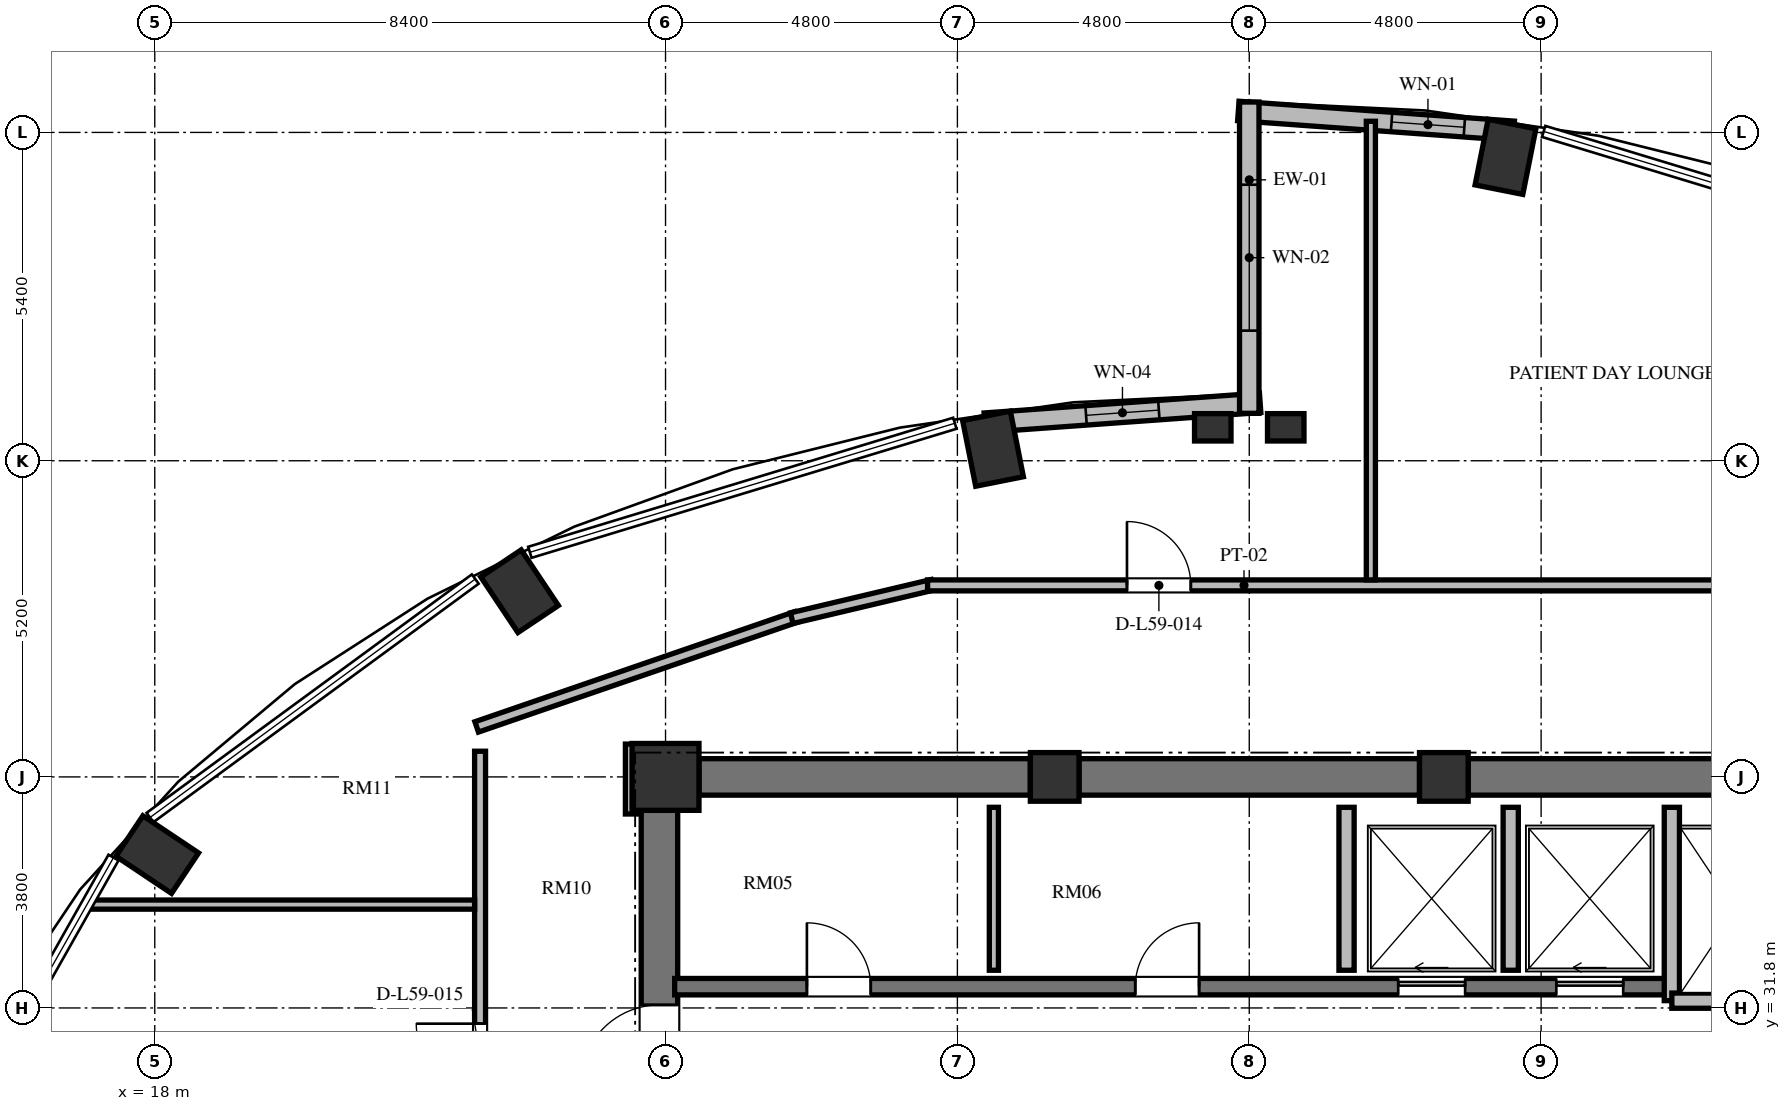
"""IFC4 building model, lengths in metres.
Left out: names, types, materials, properties, quantities, classifications, styles, units other than length and angle.
Written with IfcOpenShell. Run it as: python <this file> out.ifc"""

import sys

from ifc_helpers import new_model, si_unit, direction, frame, frame_2d, origin, origin_2d, place, context, subcontext, project, spatial, rectangle, extrude, element, fill, save


model = new_model("IFC4")
c1 = context("Model", 3, precision=1e-05, world=origin(), true_north=direction((0.0, 1.0)))
c2 = subcontext(c1, "Body", "Model", "MODEL_VIEW")
j1 = project(units=[si_unit("LENGTHUNIT", "METRE"), si_unit("PLANEANGLEUNIT", "RADIAN")], contexts=[c1])
p1 = place(None, origin())
s1 = spatial("IfcSite", under=j1, at=p1, CompositionType="ELEMENT")
p2 = place(p1, origin())
s2 = spatial("IfcBuilding", under=s1, at=p2, CompositionType="ELEMENT")
p3 = place(p2, frame((0.0, 0.0, 227.664)))
s3 = spatial("IfcBuildingStorey", under=s2, at=p3, CompositionType="ELEMENT", Elevation=227.664)
for number, where, z_axis, x_axis in (
    (1, (40.214, 45.798, 0.0), (0.0, 0.0, 1.0), (0.195, 0.981, 0.0)),
    (2, (31.786, 40.998, 0.0), (0.0, 0.0, 1.0), (-0.195, 0.981, 0.0)),
    (3, (24.0, 38.654, 0.0), (0.0, 0.0, 1.0), (-0.556, 0.831, 0.0)),
    (4, (18.04, 34.323, 0.0), (0.0, 0.0, 1.0), (-0.831, 0.556, 0.0)),
):
    element("IfcColumn", number, at=place(p3, frame(where, z_axis=z_axis, x_axis=x_axis)), inside=s3, PredefinedType="COLUMN", context=c2, shape_type="SweptSolid", body=[
        extrude(rectangle(XDim=1.1, YDim=0.8, at=origin_2d()), origin(), (0.0, 0.0, 1.0), 3.648),
    ])
for number, where, z_axis, x_axis in (
    (5, (39.2, 35.6, 0.0), (0.0, 0.0, 1.0), (1.0, 0.0, 0.0)),
    (6, (32.8, 35.6, 0.0), (0.0, 0.0, 1.0), (1.0, 0.0, 0.0)),
):
    element("IfcColumn", number, at=place(p3, frame(where, z_axis=z_axis, x_axis=x_axis)), inside=s3, PredefinedType="COLUMN", context=c2, shape_type="SweptSolid", body=[
        extrude(rectangle(XDim=0.8, YDim=0.8, at=origin_2d()), origin(), (0.0, 0.0, 1.0), 3.648),
    ])
p4 = place(p3, frame((26.4, 35.6, 0.0), z_axis=(0.0, 0.0, 1.0), x_axis=(1.0, 0.0, 0.0)))
e7 = element("IfcColumn", 7, at=p4, inside=s3, PredefinedType="COLUMN", context=c2, shape_type="SweptSolid", body=[
    extrude(rectangle(XDim=1.1, YDim=1.1, at=origin_2d()), origin(), (0.0, 0.0, 1.0), 3.648),
])
for number, where, z_axis, x_axis in (
    (8, (35.4, 41.35, 0.0), (0.0, 0.0, 1.0), (1.0, 0.0, 0.0)),
    (9, (36.6, 41.35, 0.0), (0.0, 0.0, 1.0), (1.0, 0.0, 0.0)),
):
    element("IfcColumn", number, at=place(p3, frame(where, z_axis=z_axis, x_axis=x_axis)), inside=s3, PredefinedType="PILASTER", context=c2, shape_type="SweptSolid", body=[
        extrude(rectangle(XDim=0.6, YDim=0.45, at=origin_2d()), origin(), (0.0, 0.0, 1.0), 3.648),
    ])
p5 = place(p3, frame((26.3, 20.95, 0.0), z_axis=(0.0, 0.0, 1.0), x_axis=(0.0, 1.0, 0.0)))
e10 = element("IfcWall", 10, at=p5, inside=s3, PredefinedType="SHEAR", context=c2, shape_type="SweptSolid", body=[
    extrude(rectangle(XDim=14.1, YDim=0.6, at=frame_2d((7.05, 0.0))), origin(), (0.0, 0.0, 1.0), 3.648),
])
p6 = place(p5, frame((6.5, 0.0, 0.0)))
e11 = element("IfcOpeningElement", 11, at=p6, cuts=e10, PredefinedType="OPENING", context=c2, shape_type="SweptSolid", body=[
    extrude(rectangle(XDim=1.2, YDim=2.15, at=frame_2d((0.6, 1.075))), frame((0.0, 0.31, 0.0), z_axis=(0.0, -1.0, 0.0), x_axis=(1.0, 0.0, 0.0)), (0.0, 0.0, 1.0), 0.62),
])
p7 = place(p5, frame((9.6, 0.0, 0.0)))
e12 = element("IfcOpeningElement", 12, at=p7, cuts=e10, PredefinedType="OPENING", context=c2, shape_type="SweptSolid", body=[
    extrude(rectangle(XDim=1.3, YDim=2.2, at=frame_2d((0.65, 1.1))), frame((0.0, 0.31, 0.0), z_axis=(0.0, -1.0, 0.0), x_axis=(1.0, 0.0, 0.0)), (0.0, 0.0, 1.0), 0.62),
])
p8 = place(p5, frame((3.26, 0.0, 0.0)))
e13 = element("IfcOpeningElement", 13, at=p8, cuts=e10, PredefinedType="OPENING", context=c2, shape_type="SweptSolid", body=[
    extrude(rectangle(XDim=1.3, YDim=2.2, at=frame_2d((0.65, 1.1))), frame((0.0, 0.31, 0.0), z_axis=(0.0, -1.0, 0.0), x_axis=(1.0, 0.0, 0.0)), (0.0, 0.0, 1.0), 0.62),
])
p9 = place(p3, frame((26.95, 35.6, 0.0), z_axis=(0.0, 0.0, 1.0), x_axis=(1.0, 0.0, 0.0)))
e14 = element("IfcWall", 14, at=p9, inside=s3, PredefinedType="SHEAR", context=c2, shape_type="SweptSolid", body=[
    extrude(rectangle(XDim=5.45, YDim=0.6, at=frame_2d((2.725, 0.0))), origin(), (0.0, 0.0, 1.0), 3.648),
])
p10 = place(p3, frame((33.2, 35.6, 0.0), z_axis=(0.0, 0.0, 1.0), x_axis=(1.0, 0.0, 0.0)))
e15 = element("IfcWall", 15, at=p10, inside=s3, PredefinedType="SHEAR", context=c2, shape_type="SweptSolid", body=[
    extrude(rectangle(XDim=5.6, YDim=0.6, at=frame_2d((2.8, 0.0))), origin(), (0.0, 0.0, 1.0), 3.648),
])
p11 = place(p3, frame((39.6, 35.6, 0.0), z_axis=(0.0, 0.0, 1.0), x_axis=(1.0, 0.0, 0.0)))
e16 = element("IfcWall", 16, at=p11, inside=s3, PredefinedType="SHEAR", context=c2, shape_type="SweptSolid", body=[
    extrude(rectangle(XDim=5.45, YDim=0.6, at=frame_2d((2.725, 0.0))), origin(), (0.0, 0.0, 1.0), 3.648),
])
p12 = place(p3, frame((40.35, 46.226, 0.0), z_axis=(0.0, 0.0, 1.0), x_axis=(-0.997409061056, 0.071938619141, 0.0)))
e17 = element("IfcWall", 17, at=p12, inside=s3, PredefinedType="SOLIDWALL", context=c2, shape_type="SweptSolid", body=[
    extrude(rectangle(XDim=4.541, YDim=0.32, at=frame_2d((2.271, 0.0))), origin(), (0.0, 0.0, 1.0), 3.448),
])
p13 = place(p12, frame((0.815, 0.0, 0.85)))
e18 = element("IfcOpeningElement", 18, at=p13, cuts=e17, PredefinedType="OPENING", context=c2, shape_type="SweptSolid", body=[
    extrude(rectangle(XDim=1.2, YDim=2.2, at=frame_2d((0.6, 1.1))), frame((0.0, 0.17, 0.0), z_axis=(0.0, -1.0, 0.0), x_axis=(1.0, 0.0, 0.0)), (0.0, 0.0, 1.0), 0.34),
])
p14 = place(p3, frame((36.179, 41.753, 0.0), z_axis=(0.0, 0.0, 1.0), x_axis=(-0.997408782787, -0.071942477163, 0.0)))
e19 = element("IfcWall", 19, at=p14, inside=s3, PredefinedType="SOLIDWALL", context=c2, shape_type="SweptSolid", body=[
    extrude(rectangle(XDim=4.541, YDim=0.32, at=frame_2d((2.27, 0.0))), origin(), (0.0, 0.0, 1.0), 3.448),
])
p15 = place(p14, frame((1.67, 0.0, 0.85)))
e20 = element("IfcOpeningElement", 20, at=p15, cuts=e19, PredefinedType="OPENING", context=c2, shape_type="SweptSolid", body=[
    extrude(rectangle(XDim=1.2, YDim=1.8, at=frame_2d((0.6, 0.9))), frame((0.0, 0.17, 0.0), z_axis=(0.0, -1.0, 0.0), x_axis=(1.0, 0.0, 0.0)), (0.0, 0.0, 1.0), 0.34),
])
p16 = place(p3, frame((36.0, 46.7, 0.0), z_axis=(0.0, 0.0, 1.0), x_axis=(0.0, -1.0, 0.0)))
e21 = element("IfcWall", 21, at=p16, inside=s3, PredefinedType="SOLIDWALL", context=c2, shape_type="SweptSolid", body=[
    extrude(rectangle(XDim=5.12, YDim=0.32, at=frame_2d((2.56, 0.0))), origin(), (0.0, 0.0, 1.0), 3.448),
])
p17 = place(p16, frame((1.36, 0.0, 0.84)))
e22 = element("IfcOpeningElement", 22, at=p17, cuts=e21, PredefinedType="OPENING", context=c2, shape_type="SweptSolid", body=[
    extrude(rectangle(XDim=2.4, YDim=2.04, at=frame_2d((1.2, 1.02))), frame((0.0, 0.17, 0.0), z_axis=(0.0, -1.0, 0.0), x_axis=(1.0, 0.0, 0.0)), (0.0, 0.0, 1.0), 0.34),
])
p18 = place(p3, frame((26.55, 32.15, 0.0), z_axis=(0.0, 0.0, 1.0), x_axis=(1.0, 0.0, 0.0)))
e23 = element("IfcWall", 23, at=p18, inside=s3, PredefinedType="SHEAR", context=c2, shape_type="SweptSolid", body=[
    extrude(rectangle(XDim=16.4, YDim=0.27, at=frame_2d((8.2, 0.0))), origin(), (0.0, 0.0, 1.0), 3.648),
])
p19 = place(p18, frame((2.175, 0.0, 0.0)))
e24 = element("IfcOpeningElement", 24, at=p19, cuts=e23, PredefinedType="OPENING", context=c2, shape_type="SweptSolid", body=[
    extrude(rectangle(XDim=1.05, YDim=2.15, at=frame_2d((0.525, 1.075))), frame((0.0, 0.145, 0.0), z_axis=(0.0, -1.0, 0.0), x_axis=(1.0, 0.0, 0.0)), (0.0, 0.0, 1.0), 0.29),
])
p20 = place(p18, frame((7.575, 0.0, 0.0)))
e25 = element("IfcOpeningElement", 25, at=p20, cuts=e23, PredefinedType="OPENING", context=c2, shape_type="SweptSolid", body=[
    extrude(rectangle(XDim=1.05, YDim=2.15, at=frame_2d((0.525, 1.075))), frame((0.0, 0.145, 0.0), z_axis=(0.0, -1.0, 0.0), x_axis=(1.0, 0.0, 0.0)), (0.0, 0.0, 1.0), 0.29),
])
p21 = place(p18, frame((11.9, 0.0, 0.0)))
e26 = element("IfcOpeningElement", 26, at=p21, cuts=e23, PredefinedType="OPENING", context=c2, shape_type="SweptSolid", body=[
    extrude(rectangle(XDim=1.1, YDim=2.2, at=frame_2d((0.55, 1.1))), frame((0.0, 0.145, 0.0), z_axis=(0.0, -1.0, 0.0), x_axis=(1.0, 0.0, 0.0)), (0.0, 0.0, 1.0), 0.29),
])
p22 = place(p18, frame((14.5, 0.0, 0.0)))
e27 = element("IfcOpeningElement", 27, at=p22, cuts=e23, PredefinedType="OPENING", context=c2, shape_type="SweptSolid", body=[
    extrude(rectangle(XDim=1.1, YDim=2.2, at=frame_2d((0.55, 1.1))), frame((0.0, 0.145, 0.0), z_axis=(0.0, -1.0, 0.0), x_axis=(1.0, 0.0, 0.0)), (0.0, 0.0, 1.0), 0.29),
])
p23 = place(p3, frame((42.95, 31.92, 0.0), z_axis=(0.0, 0.0, 1.0), x_axis=(0.0, 1.0, 0.0)))
e28 = element("IfcWall", 28, at=p23, inside=s3, PredefinedType="SOLIDWALL", context=c2, shape_type="SweptSolid", body=[
    extrude(rectangle(XDim=3.18, YDim=0.25, at=frame_2d((1.59, 0.0))), origin(), (0.0, 0.0, 1.0), 3.448),
])
p24 = place(p3, frame((42.95, 31.92, 0.0), z_axis=(0.0, 0.0, 1.0), x_axis=(1.0, 0.0, 0.0)))
e29 = element("IfcWall", 29, at=p24, inside=s3, PredefinedType="SOLIDWALL", context=c2, shape_type="SweptSolid", body=[
    extrude(rectangle(XDim=2.3, YDim=0.25, at=frame_2d((1.15, 0.0))), origin(), (0.0, 0.0, 1.0), 3.448),
])
for number, where, z_axis, x_axis in (
    (30, (37.6, 32.42, 0.0), (0.0, 0.0, 1.0), (0.0, 1.0, 0.0)),
    (31, (40.3, 32.42, 0.0), (0.0, 0.0, 1.0), (0.0, 1.0, 0.0)),
):
    element("IfcWall", number, at=place(p3, frame(where, z_axis=z_axis, x_axis=x_axis)), inside=s3, PredefinedType="SOLIDWALL", context=c2, shape_type="SweptSolid", body=[
        extrude(rectangle(XDim=2.68, YDim=0.25, at=frame_2d((1.34, 0.0))), origin(), (0.0, 0.0, 1.0), 3.448),
    ])
p25 = place(p3, frame((31.8, 32.42, 0.0), z_axis=(0.0, 0.0, 1.0), x_axis=(0.0, 1.0, 0.0)))
e32 = element("IfcWall", 32, at=p25, inside=s3, PredefinedType="PARTITIONING", context=c2, shape_type="SweptSolid", body=[
    extrude(rectangle(XDim=2.68, YDim=0.15, at=frame_2d((1.34, 0.0))), origin(), (0.0, 0.0, 1.0), 3.448),
])
p26 = place(p3, frame((23.294, 36.422, 0.0), z_axis=(0.0, 0.0, 1.0), x_axis=(0.945493277461, 0.325641616316, 0.0)))
e33 = element("IfcWall", 33, at=p26, inside=s3, PredefinedType="PARTITIONING", context=c2, shape_type="SweptSolid", body=[
    extrude(rectangle(XDim=5.562, YDim=0.18, at=frame_2d((2.781, 0.0))), origin(), (0.0, 0.0, 1.0), 3.073),
])
p27 = place(p3, frame((28.476, 38.211, 0.0), z_axis=(0.0, 0.0, 1.0), x_axis=(0.973030562203, 0.230676234189, 0.0)))
e34 = element("IfcWall", 34, at=p27, inside=s3, PredefinedType="PARTITIONING", context=c2, shape_type="SweptSolid", body=[
    extrude(rectangle(XDim=2.377, YDim=0.18, at=frame_2d((1.188, 0.0))), origin(), (0.0, 0.0, 1.0), 3.448),
])
p28 = place(p3, frame((30.71, 38.75, 0.0), z_axis=(0.0, 0.0, 1.0), x_axis=(1.0, 0.0, 0.0)))
e35 = element("IfcWall", 35, at=p28, inside=s3, PredefinedType="PARTITIONING", context=c2, shape_type="SweptSolid", body=[
    extrude(rectangle(XDim=20.815, YDim=0.18, at=frame_2d((10.408, 0.0))), origin(), (0.0, 0.0, 1.0), 3.073),
])
p29 = place(p28, frame((13.194, 0.0, 0.0)))
e36 = element("IfcOpeningElement", 36, at=p29, cuts=e35, PredefinedType="OPENING", context=c2, shape_type="SweptSolid", body=[
    extrude(rectangle(XDim=1.4, YDim=2.2, at=frame_2d((0.7, 1.1))), frame((0.0, 0.1, 0.0), z_axis=(0.0, -1.0, 0.0), x_axis=(1.0, 0.0, 0.0)), (0.0, 0.0, 1.0), 0.2),
])
p30 = place(p28, frame((3.279, 0.0, 0.0)))
e37 = element("IfcOpeningElement", 37, at=p30, cuts=e35, PredefinedType="OPENING", context=c2, shape_type="SweptSolid", body=[
    extrude(rectangle(XDim=1.05, YDim=2.15, at=frame_2d((0.525, 1.075))), frame((0.0, 0.1, 0.0), z_axis=(0.0, -1.0, 0.0), x_axis=(1.0, 0.0, 0.0)), (0.0, 0.0, 1.0), 0.2),
])
p31 = place(p3, frame((25.83, 36.14, 0.0), z_axis=(0.0, 0.0, 1.0), x_axis=(0.0, -1.0, 0.0)))
e38 = element("IfcWall", 38, at=p31, inside=s3, PredefinedType="PARTITIONING", context=c2, shape_type="SweptSolid", body=[
    extrude(rectangle(XDim=1.15, YDim=0.18, at=frame_2d((0.575, 0.0))), origin(), (0.0, 0.0, 1.0), 3.448),
])
p32 = place(p3, frame((23.35, 19.98, 0.0), z_axis=(0.0, 0.0, 1.0), x_axis=(0.0, 1.0, 0.0)))
e39 = element("IfcWall", 39, at=p32, inside=s3, PredefinedType="PARTITIONING", context=c2, shape_type="SweptSolid", body=[
    extrude(rectangle(XDim=16.042, YDim=0.18, at=frame_2d((8.021, 0.0))), origin(), (0.0, 0.0, 1.0), 3.448),
])
p33 = place(p32, frame((5.477, 0.0, 0.0)))
e40 = element("IfcOpeningElement", 40, at=p33, cuts=e39, PredefinedType="OPENING", context=c2, shape_type="SweptSolid", body=[
    extrude(rectangle(XDim=1.05, YDim=2.15, at=frame_2d((0.525, 1.075))), frame((0.0, 0.1, 0.0), z_axis=(0.0, -1.0, 0.0), x_axis=(1.0, 0.0, 0.0)), (0.0, 0.0, 1.0), 0.2),
])
p34 = place(p32, frame((1.219, 0.0, 0.0)))
e41 = element("IfcOpeningElement", 41, at=p34, cuts=e39, PredefinedType="OPENING", context=c2, shape_type="SweptSolid", body=[
    extrude(rectangle(XDim=1.4, YDim=2.2, at=frame_2d((0.7, 1.1))), frame((0.0, 0.1, 0.0), z_axis=(0.0, -1.0, 0.0), x_axis=(1.0, 0.0, 0.0)), (0.0, 0.0, 1.0), 0.2),
])
p35 = place(p32, frame((10.511, 0.0, 0.0)))
e42 = element("IfcOpeningElement", 42, at=p35, cuts=e39, PredefinedType="OPENING", context=c2, shape_type="SweptSolid", body=[
    extrude(rectangle(XDim=1.05, YDim=2.15, at=frame_2d((0.525, 1.075))), frame((0.0, 0.1, 0.0), z_axis=(0.0, -1.0, 0.0), x_axis=(1.0, 0.0, 0.0)), (0.0, 0.0, 1.0), 0.2),
])
p36 = place(p3, frame((16.895, 33.5, 0.0), z_axis=(0.0, 0.0, 1.0), x_axis=(1.0, 0.0, 0.0)))
e43 = element("IfcWall", 43, at=p36, inside=s3, PredefinedType="PARTITIONING", context=c2, shape_type="SweptSolid", body=[
    extrude(rectangle(XDim=6.365, YDim=0.15, at=frame_2d((3.183, 0.0))), origin(), (0.0, 0.0, 1.0), 3.448),
])
p37 = place(p3, frame((38.0, 38.84, 0.0), z_axis=(0.0, 0.0, 1.0), x_axis=(0.0, 1.0, 0.0)))
e44 = element("IfcWall", 44, at=p37, inside=s3, PredefinedType="PARTITIONING", context=c2, shape_type="SweptSolid", body=[
    extrude(rectangle(XDim=7.543, YDim=0.15, at=frame_2d((3.771, 0.0))), origin(), (0.0, 0.0, 1.0), 3.448),
])
p38 = place(p13, origin())
e45 = element("IfcWindow", 45, at=p38, inside=s3, PartitioningType="SINGLE_PANEL", PredefinedType="WINDOW", context=c2, shape_type="SweptSolid", body=[
    extrude(rectangle(XDim=1.2, YDim=2.2, at=frame_2d((0.6, 1.1))), frame((0.0, 0.03, 0.0), z_axis=(0.0, -1.0, 0.0), x_axis=(1.0, 0.0, 0.0)), (0.0, 0.0, 1.0), 0.06),
])
fill(e18, e45)
p39 = place(p15, origin())
e46 = element("IfcWindow", 46, at=p39, inside=s3, PartitioningType="SINGLE_PANEL", PredefinedType="WINDOW", context=c2, shape_type="SweptSolid", body=[
    extrude(rectangle(XDim=1.2, YDim=1.8, at=frame_2d((0.6, 0.9))), frame((0.0, 0.03, 0.0), z_axis=(0.0, -1.0, 0.0), x_axis=(1.0, 0.0, 0.0)), (0.0, 0.0, 1.0), 0.06),
])
fill(e20, e46)
p40 = place(p17, origin())
e47 = element("IfcWindow", 47, at=p40, inside=s3, PartitioningType="SINGLE_PANEL", PredefinedType="WINDOW", context=c2, shape_type="SweptSolid", body=[
    extrude(rectangle(XDim=2.4, YDim=2.04, at=frame_2d((1.2, 1.02))), frame((0.0, 0.03, 0.0), z_axis=(0.0, -1.0, 0.0), x_axis=(1.0, 0.0, 0.0)), (0.0, 0.0, 1.0), 0.06),
])
fill(e22, e47)
p41 = place(p7, origin())
e48 = element("IfcDoor", 48, at=p41, inside=s3, OperationType="SINGLE_SWING_LEFT", PredefinedType="DOOR", context=c2, shape_type="SweptSolid", body=[
    extrude(rectangle(XDim=1.3, YDim=2.2, at=frame_2d((0.65, 1.1))), frame((0.0, 0.025, 0.0), z_axis=(0.0, -1.0, 0.0), x_axis=(1.0, 0.0, 0.0)), (0.0, 0.0, 1.0), 0.05),
])
fill(e12, e48)
p42 = place(p19, origin())
e49 = element("IfcDoor", 49, at=p42, inside=s3, OperationType="SINGLE_SWING_LEFT", PredefinedType="DOOR", context=c2, shape_type="SweptSolid", body=[
    extrude(rectangle(XDim=1.05, YDim=2.15, at=frame_2d((0.525, 1.075))), frame((0.0, 0.025, 0.0), z_axis=(0.0, -1.0, 0.0), x_axis=(1.0, 0.0, 0.0)), (0.0, 0.0, 1.0), 0.05),
])
fill(e24, e49)
p43 = place(p20, origin())
e50 = element("IfcDoor", 50, at=p43, inside=s3, OperationType="SINGLE_SWING_RIGHT", PredefinedType="DOOR", context=c2, shape_type="SweptSolid", body=[
    extrude(rectangle(XDim=1.05, YDim=2.15, at=frame_2d((0.525, 1.075))), frame((0.0, 0.025, 0.0), z_axis=(0.0, -1.0, 0.0), x_axis=(1.0, 0.0, 0.0)), (0.0, 0.0, 1.0), 0.05),
])
fill(e25, e50)
p44 = place(p21, origin())
e51 = element("IfcDoor", 51, at=p44, inside=s3, OperationType="SLIDING_TO_LEFT", PredefinedType="DOOR", context=c2, shape_type="SweptSolid", body=[
    extrude(rectangle(XDim=1.1, YDim=2.2, at=frame_2d((0.55, 1.1))), frame((0.0, 0.025, 0.0), z_axis=(0.0, -1.0, 0.0), x_axis=(1.0, 0.0, 0.0)), (0.0, 0.0, 1.0), 0.05),
])
fill(e26, e51)
p45 = place(p22, origin())
e52 = element("IfcDoor", 52, at=p45, inside=s3, OperationType="SLIDING_TO_LEFT", PredefinedType="DOOR", context=c2, shape_type="SweptSolid", body=[
    extrude(rectangle(XDim=1.1, YDim=2.2, at=frame_2d((0.55, 1.1))), frame((0.0, 0.025, 0.0), z_axis=(0.0, -1.0, 0.0), x_axis=(1.0, 0.0, 0.0)), (0.0, 0.0, 1.0), 0.05),
])
fill(e27, e52)
p46 = place(p30, origin())
e53 = element("IfcDoor", 53, at=p46, inside=s3, OperationType="SINGLE_SWING_LEFT", PredefinedType="DOOR", context=c2, shape_type="SweptSolid", body=[
    extrude(rectangle(XDim=1.05, YDim=2.15, at=frame_2d((0.525, 1.075))), frame((0.0, 0.025, 0.0), z_axis=(0.0, -1.0, 0.0), x_axis=(1.0, 0.0, 0.0)), (0.0, 0.0, 1.0), 0.05),
])
fill(e37, e53)
p47 = place(p35, origin())
e54 = element("IfcDoor", 54, at=p47, inside=s3, OperationType="SINGLE_SWING_RIGHT", PredefinedType="DOOR", context=c2, shape_type="SweptSolid", body=[
    extrude(rectangle(XDim=1.05, YDim=2.15, at=frame_2d((0.525, 1.075))), frame((0.0, 0.025, 0.0), z_axis=(0.0, -1.0, 0.0), x_axis=(1.0, 0.0, 0.0)), (0.0, 0.0, 1.0), 0.05),
])
fill(e42, e54)
save(model, sys.argv[1])
